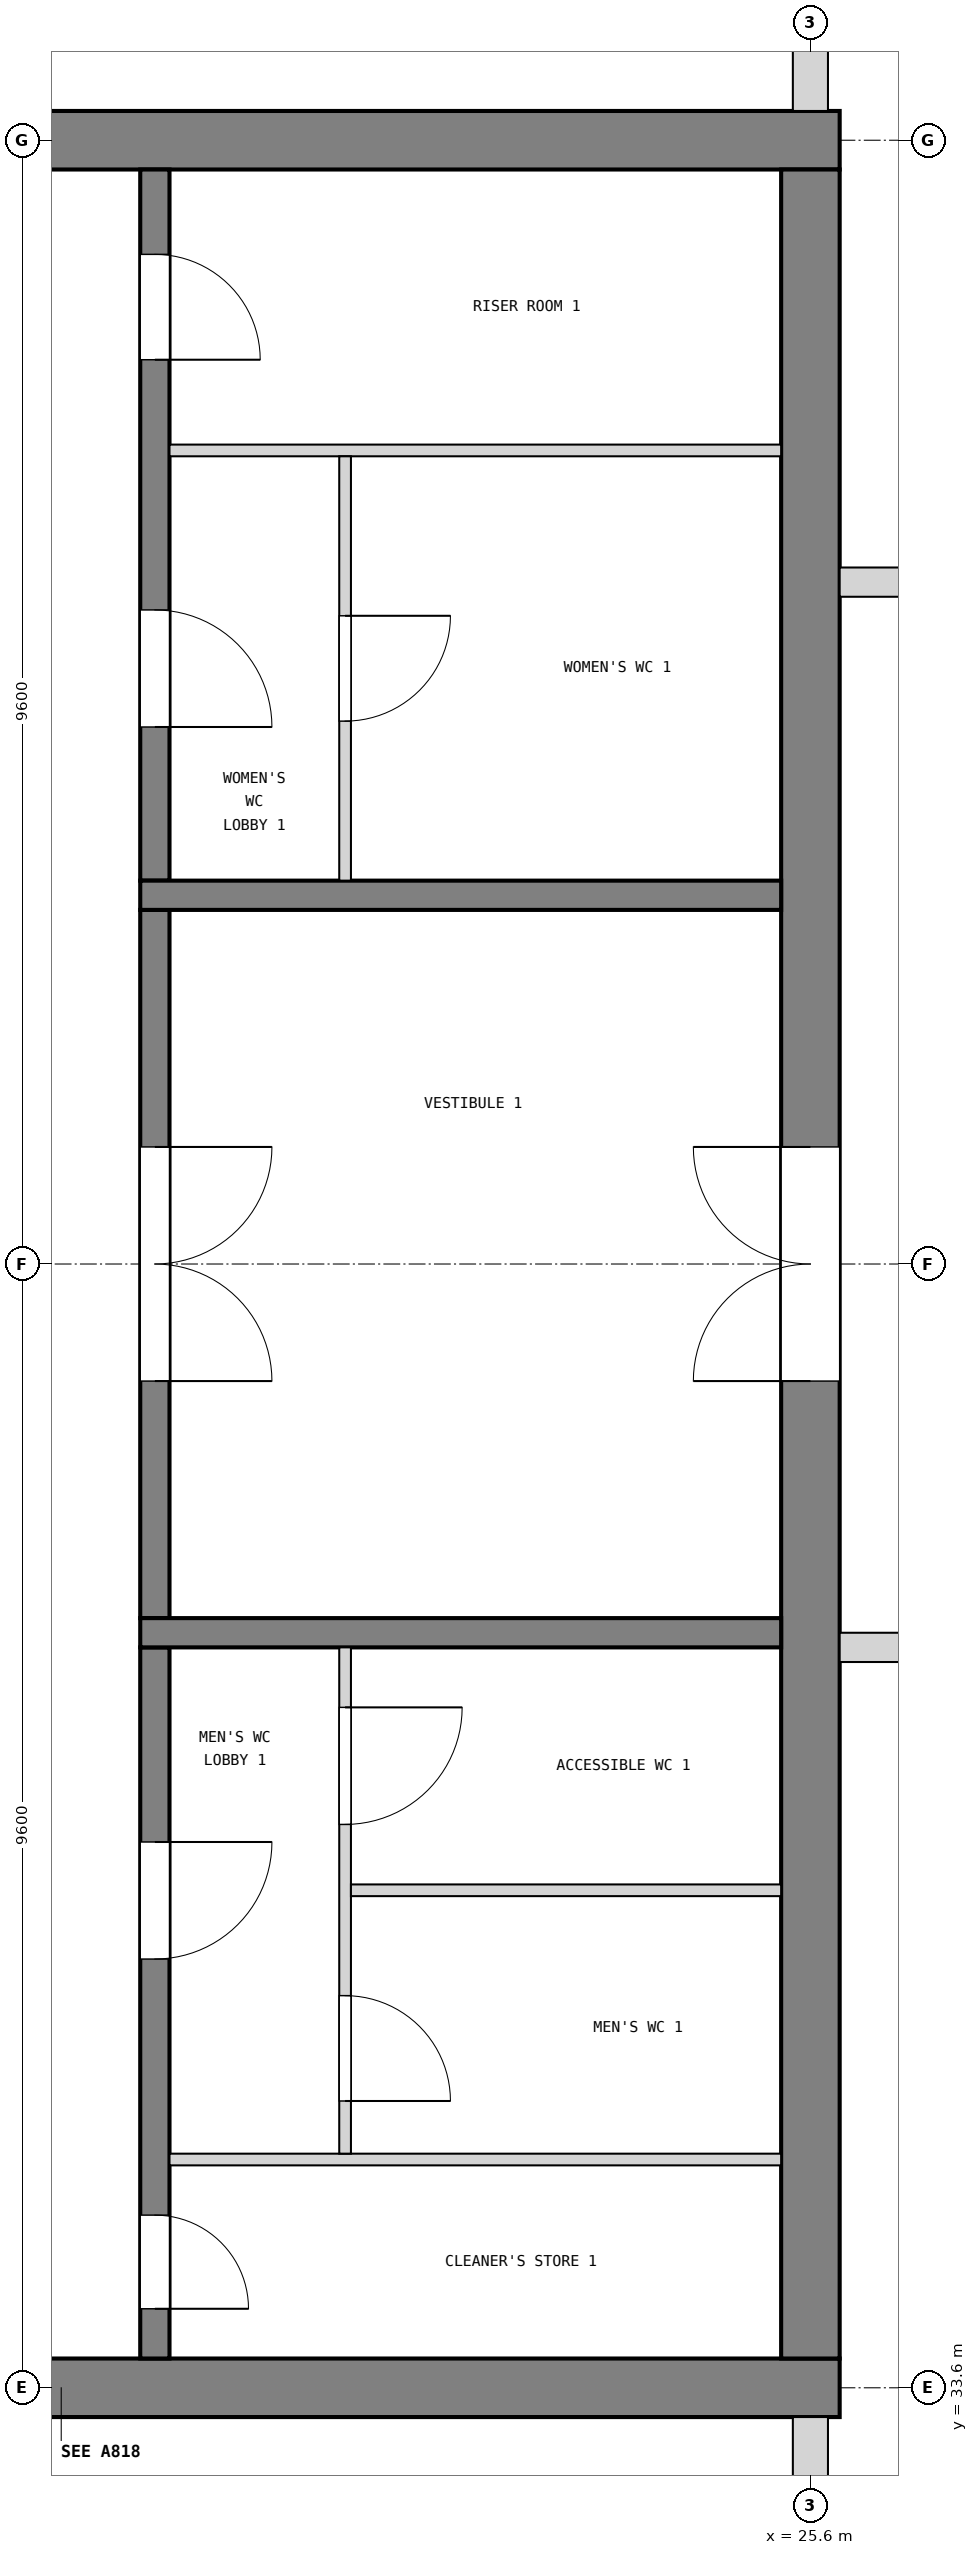
"""IFC4 building model, lengths in metres.
Left out: names, types, materials, properties, quantities, classifications, styles, units other than length and angle.
Written with IfcOpenShell. Run it as: python <this file> out.ifc"""

import sys

from ifc_helpers import new_model, si_unit, direction, frame, frame_2d, origin, place, context, subcontext, project, spatial, rectangle, extrude, element, fill, save


model = new_model("IFC4")
c1 = context("Model", 3, precision=1e-05, world=origin(), true_north=direction((0.0, 1.0)))
c2 = subcontext(c1, "Body", "Model", "MODEL_VIEW")
j1 = project(units=[si_unit("LENGTHUNIT", "METRE"), si_unit("PLANEANGLEUNIT", "RADIAN")], contexts=[c1])
p1 = place(None, origin())
s1 = spatial("IfcSite", under=j1, at=p1, CompositionType="ELEMENT")
p2 = place(p1, origin())
s2 = spatial("IfcBuilding", under=s1, at=p2, CompositionType="ELEMENT")
p3 = place(p2, frame((0.0, 0.0, 64.2)))
s3 = spatial("IfcBuildingStorey", under=s2, at=p3, CompositionType="ELEMENT", Elevation=64.2)
p4 = place(p3, frame((12.55, 52.8, 0.0), z_axis=(0.0, 0.0, 1.0), x_axis=(1.0, 0.0, 0.0)))
e1 = element("IfcWall", 1, at=p4, inside=s3, PredefinedType="SHEAR", context=c2, shape_type="SweptSolid", body=[
    extrude(rectangle(XDim=13.3, YDim=0.5, at=frame_2d((6.65, 0.0))), origin(), (0.0, 0.0, 1.0), 5.1),
])
p5 = place(p4, frame((1.85, 0.0, 1.0)))
e2 = element("IfcOpeningElement", 2, at=p5, cuts=e1, PredefinedType="OPENING", context=c2, shape_type="SweptSolid", body=[
    extrude(rectangle(XDim=0.4, YDim=2.0, at=frame_2d((0.2, 1.0))), frame((0.0, 0.26, 0.0), z_axis=(0.0, -1.0, 0.0), x_axis=(1.0, 0.0, 0.0)), (0.0, 0.0, 1.0), 0.52),
])
p6 = place(p3, frame((12.55, 33.6, 0.0), z_axis=(0.0, 0.0, 1.0), x_axis=(1.0, 0.0, 0.0)))
e3 = element("IfcWall", 3, at=p6, inside=s3, PredefinedType="SHEAR", context=c2, shape_type="SweptSolid", body=[
    extrude(rectangle(XDim=13.3, YDim=0.5, at=frame_2d((6.65, 0.0))), origin(), (0.0, 0.0, 1.0), 5.1),
])
p7 = place(p6, frame((1.85, 0.0, 1.0)))
e4 = element("IfcOpeningElement", 4, at=p7, cuts=e3, PredefinedType="OPENING", context=c2, shape_type="SweptSolid", body=[
    extrude(rectangle(XDim=0.4, YDim=2.0, at=frame_2d((0.2, 1.0))), frame((0.0, 0.26, 0.0), z_axis=(0.0, -1.0, 0.0), x_axis=(1.0, 0.0, 0.0)), (0.0, 0.0, 1.0), 0.52),
])
p8 = place(p3, frame((25.6, 33.85, 0.0), z_axis=(0.0, 0.0, 1.0), x_axis=(0.0, 1.0, 0.0)))
e5 = element("IfcWall", 5, at=p8, inside=s3, PredefinedType="SHEAR", context=c2, shape_type="SweptSolid", body=[
    extrude(rectangle(XDim=18.7, YDim=0.5, at=frame_2d((9.35, 0.0))), origin(), (0.0, 0.0, 1.0), 5.1),
])
p9 = place(p8, frame((8.35, 0.0, 0.0)))
e6 = element("IfcOpeningElement", 6, at=p9, cuts=e5, PredefinedType="OPENING", context=c2, shape_type="SweptSolid", body=[
    extrude(rectangle(XDim=2.0, YDim=2.1, at=frame_2d((1.0, 1.05))), frame((0.0, 0.26, 0.0), z_axis=(0.0, -1.0, 0.0), x_axis=(1.0, 0.0, 0.0)), (0.0, 0.0, 1.0), 0.52),
])
p10 = place(p3, frame((25.6, 31.0, 0.0), z_axis=(0.0, 0.0, 1.0), x_axis=(0.0, 1.0, 0.0)))
e7 = element("IfcWall", 7, at=p10, inside=s3, PredefinedType="SOLIDWALL", context=c2, shape_type="SweptSolid", body=[
    extrude(rectangle(XDim=2.35, YDim=0.3, at=frame_2d((1.175, 0.0))), origin(), (0.0, 0.0, 1.0), 4.3),
])
p11 = place(p3, frame((25.6, 53.05, 0.0), z_axis=(0.0, 0.0, 1.0), x_axis=(0.0, 1.0, 0.0)))
e8 = element("IfcWall", 8, at=p11, inside=s3, PredefinedType="SOLIDWALL", context=c2, shape_type="SweptSolid", body=[
    extrude(rectangle(XDim=2.35, YDim=0.3, at=frame_2d((1.175, 0.0))), origin(), (0.0, 0.0, 1.0), 4.3),
])
p12 = place(p3, frame((20.0, 33.85, 0.0), z_axis=(0.0, 0.0, 1.0), x_axis=(0.0, 1.0, 0.0)))
e9 = element("IfcWall", 9, at=p12, inside=s3, PredefinedType="SOLIDWALL", context=c2, shape_type="SweptSolid", body=[
    extrude(rectangle(XDim=6.075, YDim=0.25, at=frame_2d((3.038, 0.0))), origin(), (0.0, 0.0, 1.0), 5.1),
])
p13 = place(p12, frame((0.425, 0.0, 0.0)))
e10 = element("IfcOpeningElement", 10, at=p13, cuts=e9, PredefinedType="OPENING", context=c2, shape_type="SweptSolid", body=[
    extrude(rectangle(XDim=0.8, YDim=2.1, at=frame_2d((0.4, 1.05))), frame((0.0, 0.135, 0.0), z_axis=(0.0, -1.0, 0.0), x_axis=(1.0, 0.0, 0.0)), (0.0, 0.0, 1.0), 0.27),
])
p14 = place(p12, frame((3.413, 0.0, 0.0)))
e11 = element("IfcOpeningElement", 11, at=p14, cuts=e9, PredefinedType="OPENING", context=c2, shape_type="SweptSolid", body=[
    extrude(rectangle(XDim=1.0, YDim=2.1, at=frame_2d((0.5, 1.05))), frame((0.0, 0.135, 0.0), z_axis=(0.0, -1.0, 0.0), x_axis=(1.0, 0.0, 0.0)), (0.0, 0.0, 1.0), 0.27),
])
p15 = place(p3, frame((20.0, 40.175, 0.0), z_axis=(0.0, 0.0, 1.0), x_axis=(0.0, 1.0, 0.0)))
e12 = element("IfcWall", 12, at=p15, inside=s3, PredefinedType="SOLIDWALL", context=c2, shape_type="SweptSolid", body=[
    extrude(rectangle(XDim=6.05, YDim=0.25, at=frame_2d((3.025, 0.0))), origin(), (0.0, 0.0, 1.0), 5.1),
])
p16 = place(p15, frame((2.025, 0.0, 0.0)))
e13 = element("IfcOpeningElement", 13, at=p16, cuts=e12, PredefinedType="OPENING", context=c2, shape_type="SweptSolid", body=[
    extrude(rectangle(XDim=2.0, YDim=2.1, at=frame_2d((1.0, 1.05))), frame((0.0, 0.135, 0.0), z_axis=(0.0, -1.0, 0.0), x_axis=(1.0, 0.0, 0.0)), (0.0, 0.0, 1.0), 0.27),
])
p17 = place(p3, frame((20.0, 46.475, 0.0), z_axis=(0.0, 0.0, 1.0), x_axis=(0.0, 1.0, 0.0)))
e14 = element("IfcWall", 14, at=p17, inside=s3, PredefinedType="SOLIDWALL", context=c2, shape_type="SweptSolid", body=[
    extrude(rectangle(XDim=6.075, YDim=0.25, at=frame_2d((3.038, 0.0))), origin(), (0.0, 0.0, 1.0), 5.1),
])
p18 = place(p17, frame((1.312, 0.0, 0.0)))
e15 = element("IfcOpeningElement", 15, at=p18, cuts=e14, PredefinedType="OPENING", context=c2, shape_type="SweptSolid", body=[
    extrude(rectangle(XDim=1.0, YDim=2.1, at=frame_2d((0.5, 1.05))), frame((0.0, 0.135, 0.0), z_axis=(0.0, -1.0, 0.0), x_axis=(1.0, 0.0, 0.0)), (0.0, 0.0, 1.0), 0.27),
])
p19 = place(p17, frame((4.45, 0.0, 0.0)))
e16 = element("IfcOpeningElement", 16, at=p19, cuts=e14, PredefinedType="OPENING", context=c2, shape_type="SweptSolid", body=[
    extrude(rectangle(XDim=0.9, YDim=2.1, at=frame_2d((0.45, 1.05))), frame((0.0, 0.135, 0.0), z_axis=(0.0, -1.0, 0.0), x_axis=(1.0, 0.0, 0.0)), (0.0, 0.0, 1.0), 0.27),
])
for number, where, z_axis, x_axis in (
    (17, (19.875, 40.05, 0.0), (0.0, 0.0, 1.0), (1.0, 0.0, 0.0)),
    (18, (19.875, 46.35, 0.0), (0.0, 0.0, 1.0), (1.0, 0.0, 0.0)),
):
    element("IfcWall", number, at=place(p3, frame(where, z_axis=z_axis, x_axis=x_axis)), inside=s3, PredefinedType="SOLIDWALL", context=c2, shape_type="SweptSolid", body=[
        extrude(rectangle(XDim=5.475, YDim=0.25, at=frame_2d((2.738, 0.0))), origin(), (0.0, 0.0, 1.0), 5.1),
    ])
p20 = place(p3, frame((20.125, 35.55, 0.0), z_axis=(0.0, 0.0, 1.0), x_axis=(1.0, 0.0, 0.0)))
e19 = element("IfcWall", 19, at=p20, inside=s3, PredefinedType="PARTITIONING", context=c2, shape_type="SweptSolid", body=[
    extrude(rectangle(XDim=5.225, YDim=0.1, at=frame_2d((2.613, 0.0))), origin(), (0.0, 0.0, 1.0), 5.1),
])
p21 = place(p3, frame((21.625, 35.6, 0.0), z_axis=(0.0, 0.0, 1.0), x_axis=(0.0, 1.0, 0.0)))
e20 = element("IfcWall", 20, at=p21, inside=s3, PredefinedType="PARTITIONING", context=c2, shape_type="SweptSolid", body=[
    extrude(rectangle(XDim=4.325, YDim=0.1, at=frame_2d((2.163, 0.0))), origin(), (0.0, 0.0, 1.0), 5.1),
])
p22 = place(p21, frame((0.45, 0.0, 0.0)))
e21 = element("IfcOpeningElement", 21, at=p22, cuts=e20, PredefinedType="OPENING", context=c2, shape_type="SweptSolid", body=[
    extrude(rectangle(XDim=0.9, YDim=2.1, at=frame_2d((0.45, 1.05))), frame((0.0, 0.06, 0.0), z_axis=(0.0, -1.0, 0.0), x_axis=(1.0, 0.0, 0.0)), (0.0, 0.0, 1.0), 0.12),
])
p23 = place(p21, frame((2.812, 0.0, 0.0)))
e22 = element("IfcOpeningElement", 22, at=p23, cuts=e20, PredefinedType="OPENING", context=c2, shape_type="SweptSolid", body=[
    extrude(rectangle(XDim=1.0, YDim=2.1, at=frame_2d((0.5, 1.05))), frame((0.0, 0.06, 0.0), z_axis=(0.0, -1.0, 0.0), x_axis=(1.0, 0.0, 0.0)), (0.0, 0.0, 1.0), 0.12),
])
p24 = place(p3, frame((21.675, 37.85, 0.0), z_axis=(0.0, 0.0, 1.0), x_axis=(1.0, 0.0, 0.0)))
e23 = element("IfcWall", 23, at=p24, inside=s3, PredefinedType="PARTITIONING", context=c2, shape_type="SweptSolid", body=[
    extrude(rectangle(XDim=3.675, YDim=0.1, at=frame_2d((1.837, 0.0))), origin(), (0.0, 0.0, 1.0), 5.1),
])
p25 = place(p3, frame((20.125, 50.15, 0.0), z_axis=(0.0, 0.0, 1.0), x_axis=(1.0, 0.0, 0.0)))
e24 = element("IfcWall", 24, at=p25, inside=s3, PredefinedType="PARTITIONING", context=c2, shape_type="SweptSolid", body=[
    extrude(rectangle(XDim=5.225, YDim=0.1, at=frame_2d((2.613, 0.0))), origin(), (0.0, 0.0, 1.0), 5.1),
])
p26 = place(p3, frame((21.625, 46.475, 0.0), z_axis=(0.0, 0.0, 1.0), x_axis=(0.0, 1.0, 0.0)))
e25 = element("IfcWall", 25, at=p26, inside=s3, PredefinedType="PARTITIONING", context=c2, shape_type="SweptSolid", body=[
    extrude(rectangle(XDim=3.625, YDim=0.1, at=frame_2d((1.812, 0.0))), origin(), (0.0, 0.0, 1.0), 5.1),
])
p27 = place(p26, frame((1.363, 0.0, 0.0)))
e26 = element("IfcOpeningElement", 26, at=p27, cuts=e25, PredefinedType="OPENING", context=c2, shape_type="SweptSolid", body=[
    extrude(rectangle(XDim=0.9, YDim=2.1, at=frame_2d((0.45, 1.05))), frame((0.0, 0.06, 0.0), z_axis=(0.0, -1.0, 0.0), x_axis=(1.0, 0.0, 0.0)), (0.0, 0.0, 1.0), 0.12),
])
p28 = place(p3, frame((25.85, 49.025, 0.0), z_axis=(0.0, 0.0, 1.0), x_axis=(1.0, 0.0, 0.0)))
e27 = element("IfcWall", 27, at=p28, inside=s3, PredefinedType="PARTITIONING", context=c2, shape_type="SweptSolid", body=[
    extrude(rectangle(XDim=7.84, YDim=0.25, at=frame_2d((3.92, 0.0))), origin(), (0.0, 0.0, 1.0), 5.1),
])
p29 = place(p28, frame((3.25, 0.0, 0.0)))
e28 = element("IfcOpeningElement", 28, at=p29, cuts=e27, PredefinedType="OPENING", context=c2, shape_type="SweptSolid", body=[
    extrude(rectangle(XDim=1.2, YDim=2.1, at=frame_2d((0.6, 1.05))), frame((0.0, 0.135, 0.0), z_axis=(0.0, -1.0, 0.0), x_axis=(1.0, 0.0, 0.0)), (0.0, 0.0, 1.0), 0.27),
])
p30 = place(p3, frame((25.85, 39.925, 0.0), z_axis=(0.0, 0.0, 1.0), x_axis=(1.0, 0.0, 0.0)))
e29 = element("IfcWall", 29, at=p30, inside=s3, PredefinedType="PARTITIONING", context=c2, shape_type="SweptSolid", body=[
    extrude(rectangle(XDim=5.97, YDim=0.25, at=frame_2d((2.985, 0.0))), origin(), (0.0, 0.0, 1.0), 5.1),
])
p31 = place(p30, frame((2.3, 0.0, 0.0)))
e30 = element("IfcOpeningElement", 30, at=p31, cuts=e29, PredefinedType="OPENING", context=c2, shape_type="SweptSolid", body=[
    extrude(rectangle(XDim=1.2, YDim=2.1, at=frame_2d((0.6, 1.05))), frame((0.0, 0.135, 0.0), z_axis=(0.0, -1.0, 0.0), x_axis=(1.0, 0.0, 0.0)), (0.0, 0.0, 1.0), 0.27),
])
p32 = place(p16, frame((2.0, 0.0, 0.0), z_axis=(0.0, 0.0, 1.0), x_axis=(-1.0, 0.0, 0.0)))
e31 = element("IfcDoor", 31, at=p32, inside=s3, OperationType="DOUBLE_DOOR_SINGLE_SWING", PredefinedType="DOOR", context=c2, shape_type="SweptSolid", body=[
    extrude(rectangle(XDim=2.0, YDim=2.1, at=frame_2d((1.0, 1.05))), frame((0.0, 0.025, 0.0), z_axis=(0.0, -1.0, 0.0), x_axis=(1.0, 0.0, 0.0)), (0.0, 0.0, 1.0), 0.05),
])
fill(e13, e31)
p33 = place(p9, origin())
e32 = element("IfcDoor", 32, at=p33, inside=s3, OperationType="DOUBLE_DOOR_SINGLE_SWING", PredefinedType="DOOR", context=c2, shape_type="SweptSolid", body=[
    extrude(rectangle(XDim=2.0, YDim=2.1, at=frame_2d((1.0, 1.05))), frame((0.0, 0.025, 0.0), z_axis=(0.0, -1.0, 0.0), x_axis=(1.0, 0.0, 0.0)), (0.0, 0.0, 1.0), 0.05),
])
fill(e6, e32)
p34 = place(p13, frame((0.8, 0.0, 0.0), z_axis=(0.0, 0.0, 1.0), x_axis=(-1.0, 0.0, 0.0)))
e33 = element("IfcDoor", 33, at=p34, inside=s3, OperationType="SINGLE_SWING_RIGHT", PredefinedType="DOOR", context=c2, shape_type="SweptSolid", body=[
    extrude(rectangle(XDim=0.8, YDim=2.1, at=frame_2d((0.4, 1.05))), frame((0.0, 0.025, 0.0), z_axis=(0.0, -1.0, 0.0), x_axis=(1.0, 0.0, 0.0)), (0.0, 0.0, 1.0), 0.05),
])
fill(e10, e33)
p35 = place(p14, frame((1.0, 0.0, 0.0), z_axis=(0.0, 0.0, 1.0), x_axis=(-1.0, 0.0, 0.0)))
e34 = element("IfcDoor", 34, at=p35, inside=s3, OperationType="SINGLE_SWING_LEFT", PredefinedType="DOOR", context=c2, shape_type="SweptSolid", body=[
    extrude(rectangle(XDim=1.0, YDim=2.1, at=frame_2d((0.5, 1.05))), frame((0.0, 0.025, 0.0), z_axis=(0.0, -1.0, 0.0), x_axis=(1.0, 0.0, 0.0)), (0.0, 0.0, 1.0), 0.05),
])
fill(e11, e34)
p36 = place(p22, frame((0.9, 0.0, 0.0), z_axis=(0.0, 0.0, 1.0), x_axis=(-1.0, 0.0, 0.0)))
e35 = element("IfcDoor", 35, at=p36, inside=s3, OperationType="SINGLE_SWING_RIGHT", PredefinedType="DOOR", context=c2, shape_type="SweptSolid", body=[
    extrude(rectangle(XDim=0.9, YDim=2.1, at=frame_2d((0.45, 1.05))), frame((0.0, 0.025, 0.0), z_axis=(0.0, -1.0, 0.0), x_axis=(1.0, 0.0, 0.0)), (0.0, 0.0, 1.0), 0.05),
])
fill(e21, e35)
p37 = place(p23, frame((1.0, 0.0, 0.0), z_axis=(0.0, 0.0, 1.0), x_axis=(-1.0, 0.0, 0.0)))
e36 = element("IfcDoor", 36, at=p37, inside=s3, OperationType="SINGLE_SWING_LEFT", PredefinedType="DOOR", context=c2, shape_type="SweptSolid", body=[
    extrude(rectangle(XDim=1.0, YDim=2.1, at=frame_2d((0.5, 1.05))), frame((0.0, 0.025, 0.0), z_axis=(0.0, -1.0, 0.0), x_axis=(1.0, 0.0, 0.0)), (0.0, 0.0, 1.0), 0.05),
])
fill(e22, e36)
p38 = place(p18, frame((1.0, 0.0, 0.0), z_axis=(0.0, 0.0, 1.0), x_axis=(-1.0, 0.0, 0.0)))
e37 = element("IfcDoor", 37, at=p38, inside=s3, OperationType="SINGLE_SWING_RIGHT", PredefinedType="DOOR", context=c2, shape_type="SweptSolid", body=[
    extrude(rectangle(XDim=1.0, YDim=2.1, at=frame_2d((0.5, 1.05))), frame((0.0, 0.025, 0.0), z_axis=(0.0, -1.0, 0.0), x_axis=(1.0, 0.0, 0.0)), (0.0, 0.0, 1.0), 0.05),
])
fill(e15, e37)
p39 = place(p27, frame((0.9, 0.0, 0.0), z_axis=(0.0, 0.0, 1.0), x_axis=(-1.0, 0.0, 0.0)))
e38 = element("IfcDoor", 38, at=p39, inside=s3, OperationType="SINGLE_SWING_LEFT", PredefinedType="DOOR", context=c2, shape_type="SweptSolid", body=[
    extrude(rectangle(XDim=0.9, YDim=2.1, at=frame_2d((0.45, 1.05))), frame((0.0, 0.025, 0.0), z_axis=(0.0, -1.0, 0.0), x_axis=(1.0, 0.0, 0.0)), (0.0, 0.0, 1.0), 0.05),
])
fill(e26, e38)
p40 = place(p19, frame((0.9, 0.0, 0.0), z_axis=(0.0, 0.0, 1.0), x_axis=(-1.0, 0.0, 0.0)))
e39 = element("IfcDoor", 39, at=p40, inside=s3, OperationType="SINGLE_SWING_RIGHT", PredefinedType="DOOR", context=c2, shape_type="SweptSolid", body=[
    extrude(rectangle(XDim=0.9, YDim=2.1, at=frame_2d((0.45, 1.05))), frame((0.0, 0.025, 0.0), z_axis=(0.0, -1.0, 0.0), x_axis=(1.0, 0.0, 0.0)), (0.0, 0.0, 1.0), 0.05),
])
fill(e16, e39)
save(model, sys.argv[1])
